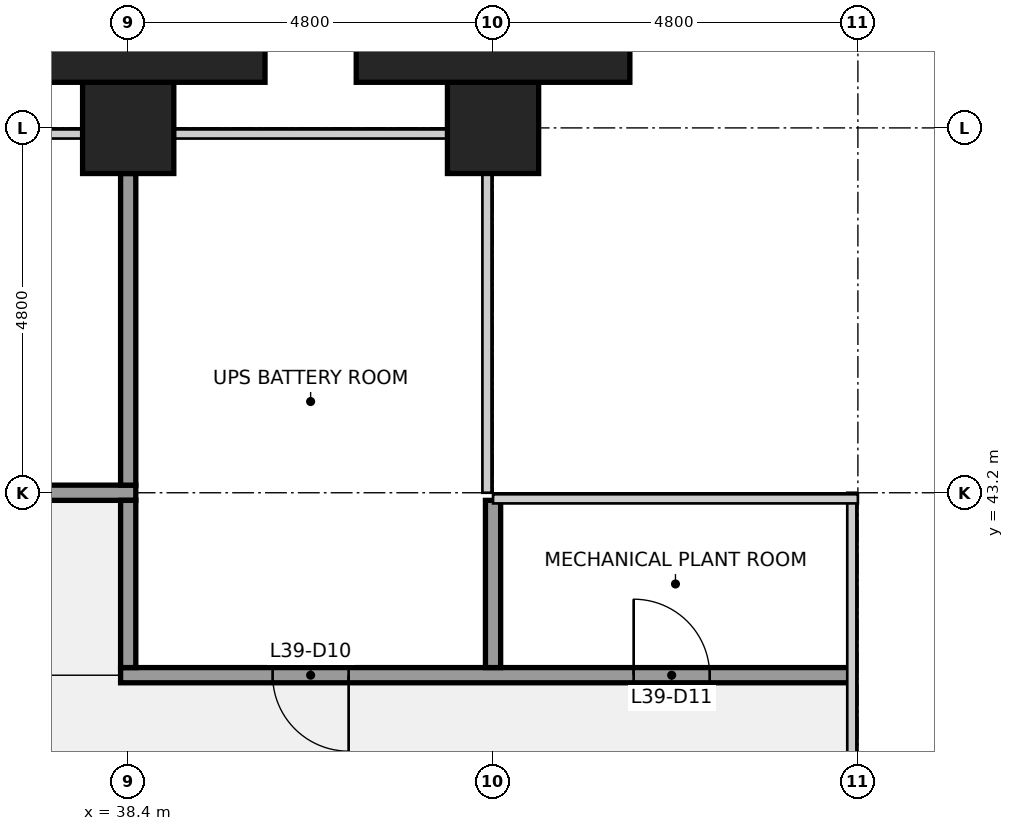
"""IFC4 building model, lengths in metres.
Left out: names, types, materials, properties, quantities, classifications, styles, units other than length and angle.
Written with IfcOpenShell. Run it as: python <this file> out.ifc"""

import sys

from ifc_helpers import new_model, si_unit, direction, frame, frame_2d, origin, origin_2d, place, context, subcontext, project, spatial, rectangle, extrude, element, fill, save


model = new_model("IFC4")
c1 = context("Model", 3, precision=1e-05, world=origin(), true_north=direction((0.0, 1.0)))
c2 = subcontext(c1, "Body", "Model", "MODEL_VIEW")
j1 = project(units=[si_unit("LENGTHUNIT", "METRE"), si_unit("PLANEANGLEUNIT", "RADIAN")], contexts=[c1])
p1 = place(None, origin())
s1 = spatial("IfcSite", under=j1, at=p1, CompositionType="ELEMENT")
p2 = place(p1, origin())
s2 = spatial("IfcBuilding", under=s1, at=p2, CompositionType="ELEMENT")
p3 = place(p2, frame((0.0, 0.0, 176.1)))
s3 = spatial("IfcBuildingStorey", under=s2, at=p3, CompositionType="ELEMENT", Elevation=176.1)
for number, where, z_axis, x_axis in (
    (1, (38.4, 48.0, 0.0), (0.0, 0.0, 1.0), (1.0, 0.0, 0.0)),
    (2, (43.2, 48.0, 0.0), (0.0, 0.0, 1.0), (1.0, 0.0, 0.0)),
):
    element("IfcColumn", number, at=place(p3, frame(where, z_axis=z_axis, x_axis=x_axis)), inside=s3, PredefinedType="COLUMN", context=c2, shape_type="SweptSolid", body=[
        extrude(rectangle(XDim=1.2, YDim=1.2, at=origin_2d()), origin(), (0.0, 0.0, 1.0), 4.5),
    ])
p4 = place(p3, frame((38.3, 40.8, 0.0), z_axis=(0.0, 0.0, 1.0), x_axis=(1.0, 0.0, 0.0)))
e3 = element("IfcWall", 3, at=p4, inside=s3, PredefinedType="PARTITIONING", context=c2, shape_type="SweptSolid", body=[
    extrude(rectangle(XDim=9.6, YDim=0.2, at=frame_2d((4.8, 0.0))), origin(), (0.0, 0.0, 1.0), 2.992),
])
p5 = place(p4, frame((2.0, 0.0, 0.0)))
e4 = element("IfcOpeningElement", 4, at=p5, cuts=e3, PredefinedType="OPENING", context=c2, shape_type="SweptSolid", body=[
    extrude(rectangle(XDim=1.0, YDim=2.1, at=frame_2d((0.5, 1.05))), frame((0.0, 0.11, 0.0), z_axis=(0.0, -1.0, 0.0), x_axis=(1.0, 0.0, 0.0)), (0.0, 0.0, 1.0), 0.22),
])
p6 = place(p4, frame((6.75, 0.0, 0.0)))
e5 = element("IfcOpeningElement", 5, at=p6, cuts=e3, PredefinedType="OPENING", context=c2, shape_type="SweptSolid", body=[
    extrude(rectangle(XDim=1.0, YDim=2.1, at=frame_2d((0.5, 1.05))), frame((0.0, 0.11, 0.0), z_axis=(0.0, -1.0, 0.0), x_axis=(1.0, 0.0, 0.0)), (0.0, 0.0, 1.0), 0.22),
])
p7 = place(p3, frame((19.1, 43.2, 0.0), z_axis=(0.0, 0.0, 1.0), x_axis=(1.0, 0.0, 0.0)))
e6 = element("IfcWall", 6, at=p7, inside=s3, PredefinedType="PARTITIONING", context=c2, shape_type="SweptSolid", body=[
    extrude(rectangle(XDim=19.4, YDim=0.2, at=frame_2d((9.7, 0.0))), origin(), (0.0, 0.0, 1.0), 2.992),
])
p8 = place(p7, frame((9.2, 0.0, 0.0)))
e7 = element("IfcOpeningElement", 7, at=p8, cuts=e6, PredefinedType="OPENING", context=c2, shape_type="SweptSolid", body=[
    extrude(rectangle(XDim=1.0, YDim=2.1, at=frame_2d((0.5, 1.05))), frame((0.0, 0.11, 0.0), z_axis=(0.0, -1.0, 0.0), x_axis=(1.0, 0.0, 0.0)), (0.0, 0.0, 1.0), 0.22),
])
p9 = place(p3, frame((38.4, 40.9, 0.0), z_axis=(0.0, 0.0, 1.0), x_axis=(0.0, 1.0, 0.0)))
e8 = element("IfcWall", 8, at=p9, inside=s3, PredefinedType="PARTITIONING", context=c2, shape_type="SweptSolid", body=[
    extrude(rectangle(XDim=2.2, YDim=0.2, at=frame_2d((1.1, 0.0))), origin(), (0.0, 0.0, 1.0), 2.992),
])
p10 = place(p3, frame((38.4, 43.3, 0.0), z_axis=(0.0, 0.0, 1.0), x_axis=(0.0, 1.0, 0.0)))
e9 = element("IfcWall", 9, at=p10, inside=s3, PredefinedType="PARTITIONING", context=c2, shape_type="SweptSolid", body=[
    extrude(rectangle(XDim=4.1, YDim=0.2, at=frame_2d((2.05, 0.0))), origin(), (0.0, 0.0, 1.0), 2.992),
])
p11 = place(p3, frame((43.2, 40.9, 0.0), z_axis=(0.0, 0.0, 1.0), x_axis=(0.0, 1.0, 0.0)))
e10 = element("IfcWall", 10, at=p11, inside=s3, PredefinedType="PARTITIONING", context=c2, shape_type="SweptSolid", body=[
    extrude(rectangle(XDim=2.2, YDim=0.2, at=frame_2d((1.1, 0.0))), origin(), (0.0, 0.0, 1.0), 2.992),
])
for number, where, z_axis, x_axis in (
    (11, (38.4, 49.05, 0.0), (0.0, 0.0, 1.0), (1.0, 0.0, 0.0)),
    (12, (43.2, 49.05, 0.0), (0.0, 0.0, 1.0), (1.0, 0.0, 0.0)),
):
    element("IfcColumn", number, at=place(p3, frame(where, z_axis=z_axis, x_axis=x_axis)), inside=s3, PredefinedType="PILASTER", context=c2, shape_type="SweptSolid", body=[
        extrude(rectangle(XDim=3.6, YDim=0.9, at=origin_2d()), origin(), (0.0, 0.0, 1.0), 4.5),
    ])
p12 = place(p5, origin())
e13 = element("IfcDoor", 13, at=p12, inside=s3, OperationType="SINGLE_SWING_RIGHT", PredefinedType="DOOR", context=c2, shape_type="SweptSolid", body=[
    extrude(rectangle(XDim=1.0, YDim=2.1, at=frame_2d((0.5, 1.05))), frame((0.0, 0.025, 0.0), z_axis=(0.0, -1.0, 0.0), x_axis=(1.0, 0.0, 0.0)), (0.0, 0.0, 1.0), 0.05),
])
fill(e4, e13)
p13 = place(p6, origin())
e14 = element("IfcDoor", 14, at=p13, inside=s3, OperationType="SINGLE_SWING_LEFT", PredefinedType="DOOR", context=c2, shape_type="SweptSolid", body=[
    extrude(rectangle(XDim=1.0, YDim=2.1, at=frame_2d((0.5, 1.05))), frame((0.0, 0.025, 0.0), z_axis=(0.0, -1.0, 0.0), x_axis=(1.0, 0.0, 0.0)), (0.0, 0.0, 1.0), 0.05),
])
fill(e5, e14)
save(model, sys.argv[1])
